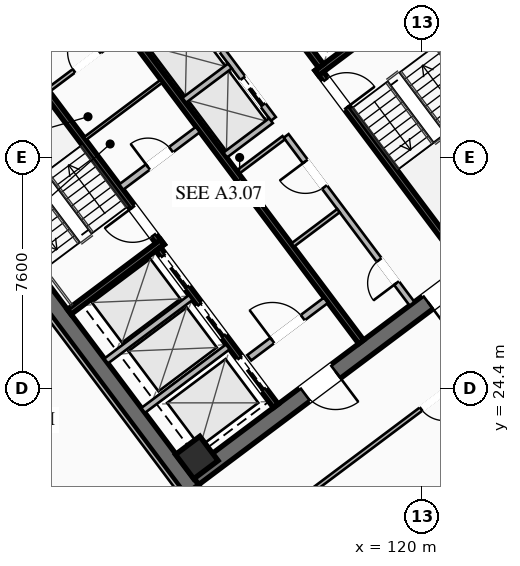
"""IFC4 building model, lengths in metres.
Left out: names, types, materials, properties, quantities, classifications, styles, units other than length and angle.
Written with IfcOpenShell. Run it as: python <this file> out.ifc"""

import sys

from ifc_helpers import new_model, si_unit, direction, frame, frame_2d, origin, origin_2d, place, context, subcontext, project, spatial, rectangle, hollow_rectangle, extrude, element, fill, save


model = new_model("IFC4")
c1 = context("Model", 3, precision=1e-05, world=origin(), true_north=direction((0.0, 1.0)))
c2 = subcontext(c1, "Body", "Model", "MODEL_VIEW")
j1 = project(units=[si_unit("LENGTHUNIT", "METRE"), si_unit("PLANEANGLEUNIT", "RADIAN")], contexts=[c1])
p1 = place(None, origin())
s1 = spatial("IfcSite", under=j1, at=p1, CompositionType="ELEMENT")
p2 = place(p1, origin())
s2 = spatial("IfcBuilding", under=s1, at=p2, CompositionType="ELEMENT")
p3 = place(p2, frame((0.0, 0.0, 185.4)))
s3 = spatial("IfcBuildingStorey", under=s2, at=p3, CompositionType="ELEMENT", Elevation=185.4)
for number, where, z_axis, x_axis in (
    (1, (112.436, 21.077, 0.0), (0.0, 0.0, 1.0), (-0.6, 0.8, 0.0)),
    (2, (115.564, 42.923, 0.0), (0.0, 0.0, 1.0), (0.6, -0.8, 0.0)),
):
    element("IfcWall", number, at=place(p3, frame(where, z_axis=z_axis, x_axis=x_axis)), inside=s3, PredefinedType="SHEAR", context=c2, shape_type="SweptSolid", body=[
        extrude(rectangle(XDim=15.6, YDim=0.55, at=frame_2d((7.8, 0.0))), origin(), (0.0, 0.0, 1.0), 3.55),
    ])
p4 = place(p3, frame((124.539, 30.498, 0.0), z_axis=(0.0, 0.0, 1.0), x_axis=(-0.799998054672, -0.600002593761, 0.0)))
e3 = element("IfcWall", 3, at=p4, inside=s3, PredefinedType="SHEAR", context=c2, shape_type="SweptSolid", body=[
    extrude(rectangle(XDim=15.06, YDim=0.55, at=frame_2d((7.53, 0.0))), origin(), (0.0, 0.0, 1.0), 3.55),
])
p5 = place(p4, frame((9.23, 0.0, 0.0)))
e4 = element("IfcOpeningElement", 4, at=p5, cuts=e3, PredefinedType="OPENING", context=c2, shape_type="SweptSolid", body=[
    extrude(rectangle(XDim=1.25, YDim=2.25, at=frame_2d((0.625, 1.125))), frame((0.0, 0.285, 0.0), z_axis=(0.0, -1.0, 0.0), x_axis=(1.0, 0.0, 0.0)), (0.0, 0.0, 1.0), 0.57),
])
p6 = place(p4, frame((4.18, 0.0, 0.0)))
e5 = element("IfcOpeningElement", 5, at=p6, cuts=e3, PredefinedType="OPENING", context=c2, shape_type="SweptSolid", body=[
    extrude(rectangle(XDim=1.25, YDim=2.25, at=frame_2d((0.625, 1.125))), frame((0.0, 0.285, 0.0), z_axis=(0.0, -1.0, 0.0), x_axis=(1.0, 0.0, 0.0)), (0.0, 0.0, 1.0), 0.57),
])
p7 = place(p3, frame((103.461, 33.502, 0.0), z_axis=(0.0, 0.0, 1.0), x_axis=(0.799998054672, 0.600002593761, 0.0)))
e6 = element("IfcWall", 6, at=p7, inside=s3, PredefinedType="SHEAR", context=c2, shape_type="SweptSolid", body=[
    extrude(rectangle(XDim=15.06, YDim=0.55, at=frame_2d((7.53, 0.0))), origin(), (0.0, 0.0, 1.0), 3.55),
])
p8 = place(p7, frame((4.58, 0.0, 0.0)))
e7 = element("IfcOpeningElement", 7, at=p8, cuts=e6, PredefinedType="OPENING", context=c2, shape_type="SweptSolid", body=[
    extrude(rectangle(XDim=1.25, YDim=2.25, at=frame_2d((0.625, 1.125))), frame((0.0, 0.285, 0.0), z_axis=(0.0, -1.0, 0.0), x_axis=(1.0, 0.0, 0.0)), (0.0, 0.0, 1.0), 0.57),
])
p9 = place(p7, frame((9.63, 0.0, 0.0)))
e8 = element("IfcOpeningElement", 8, at=p9, cuts=e6, PredefinedType="OPENING", context=c2, shape_type="SweptSolid", body=[
    extrude(rectangle(XDim=1.25, YDim=2.25, at=frame_2d((0.625, 1.125))), frame((0.0, 0.285, 0.0), z_axis=(0.0, -1.0, 0.0), x_axis=(1.0, 0.0, 0.0)), (0.0, 0.0, 1.0), 0.57),
])
p10 = place(p3, frame((112.59, 22.13, 0.0), z_axis=(0.0, 0.0, 1.0), x_axis=(0.799999996291, 0.600000004945, 0.0)))
e9 = element("IfcColumn", 9, at=p10, inside=s3, PredefinedType="COLUMN", context=c2, shape_type="SweptSolid", body=[
    extrude(hollow_rectangle(XDim=1.0, YDim=1.0, WallThickness=0.04, at=origin_2d()), origin(), (0.0, 0.0, 1.0), 3.37),
])
p11 = place(p3, frame((111.44, 29.08, 0.0), z_axis=(0.0, 0.0, 1.0), x_axis=(-0.59999029481, 0.8000072788, 0.0)))
e10 = element("IfcWall", 10, at=p11, inside=s3, PredefinedType="SHEAR", context=c2, shape_type="SweptSolid", body=[
    extrude(rectangle(XDim=8.05, YDim=0.2, at=frame_2d((4.025, 0.0))), origin(), (0.0, 0.0, 1.0), 3.37),
])
p12 = place(p11, frame((0.45, 0.0, 0.0)))
e11 = element("IfcOpeningElement", 11, at=p12, cuts=e10, PredefinedType="OPENING", context=c2, shape_type="SweptSolid", body=[
    extrude(rectangle(XDim=1.15, YDim=2.2, at=frame_2d((0.575, 1.1))), frame((0.0, 0.11, 0.0), z_axis=(0.0, -1.0, 0.0), x_axis=(1.0, 0.0, 0.0)), (0.0, 0.0, 1.0), 0.22),
])
p13 = place(p3, frame((108.396, 26.922, 0.0), z_axis=(0.0, 0.0, 1.0), x_axis=(0.800015298837, 0.599979601008, 0.0)))
e12 = element("IfcWall", 12, at=p13, inside=s3, PredefinedType="SHEAR", context=c2, shape_type="SweptSolid", body=[
    extrude(rectangle(XDim=3.83, YDim=0.2, at=frame_2d((1.915, 0.0))), origin(), (0.0, 0.0, 1.0), 3.37),
])
p14 = place(p3, frame((116.56, 34.92, 0.0), z_axis=(0.0, 0.0, 1.0), x_axis=(0.59999029481, -0.8000072788, 0.0)))
e13 = element("IfcWall", 13, at=p14, inside=s3, PredefinedType="SHEAR", context=c2, shape_type="SweptSolid", body=[
    extrude(rectangle(XDim=8.05, YDim=0.2, at=frame_2d((4.025, 0.0))), origin(), (0.0, 0.0, 1.0), 3.37),
])
p15 = place(p14, frame((0.45, 0.0, 0.0)))
e14 = element("IfcOpeningElement", 14, at=p15, cuts=e13, PredefinedType="OPENING", context=c2, shape_type="SweptSolid", body=[
    extrude(rectangle(XDim=1.15, YDim=2.2, at=frame_2d((0.575, 1.1))), frame((0.0, 0.11, 0.0), z_axis=(0.0, -1.0, 0.0), x_axis=(1.0, 0.0, 0.0)), (0.0, 0.0, 1.0), 0.22),
])
p16 = place(p3, frame((116.54, 34.78, 0.0), z_axis=(0.0, 0.0, 1.0), x_axis=(0.800015298837, 0.599979601008, 0.0)))
e15 = element("IfcWall", 15, at=p16, inside=s3, PredefinedType="SHEAR", context=c2, shape_type="SweptSolid", body=[
    extrude(rectangle(XDim=3.83, YDim=0.2, at=frame_2d((1.915, 0.0))), origin(), (0.0, 0.0, 1.0), 3.37),
])
p17 = place(p3, frame((117.998, 25.936, 0.0), z_axis=(0.0, 0.0, 1.0), x_axis=(-0.600002693989, 0.799997979501, 0.0)))
e16 = element("IfcWall", 16, at=p17, inside=s3, PredefinedType="SHEAR", context=c2, shape_type="SweptSolid", body=[
    extrude(rectangle(XDim=14.5, YDim=0.2, at=frame_2d((7.25, 0.0))), origin(), (0.0, 0.0, 1.0), 3.37),
])
p18 = place(p3, frame((110.104, 31.028, 0.0), z_axis=(0.0, 0.0, 1.0), x_axis=(0.800018601094, 0.59997519774, 0.0)))
e17 = element("IfcWall", 17, at=p18, inside=s3, PredefinedType="SOLIDWALL", context=c2, shape_type="SweptSolid", body=[
    extrude(rectangle(XDim=3.15, YDim=0.22, at=frame_2d((1.575, 0.0))), origin(), (0.0, 0.0, 1.0), 2.723),
])
p19 = place(p18, frame((1.1, 0.0, 0.0)))
e18 = element("IfcOpeningElement", 18, at=p19, cuts=e17, PredefinedType="OPENING", context=c2, shape_type="SweptSolid", body=[
    extrude(rectangle(XDim=0.95, YDim=2.05, at=frame_2d((0.475, 1.025))), frame((0.0, 0.12, 0.0), z_axis=(0.0, -1.0, 0.0), x_axis=(1.0, 0.0, 0.0)), (0.0, 0.0, 1.0), 0.24),
])
p20 = place(p3, frame((114.316, 25.412, 0.0), z_axis=(0.0, 0.0, 1.0), x_axis=(0.800018601094, 0.59997519774, 0.0)))
e19 = element("IfcWall", 19, at=p20, inside=s3, PredefinedType="SOLIDWALL", context=c2, shape_type="SweptSolid", body=[
    extrude(rectangle(XDim=3.15, YDim=0.22, at=frame_2d((1.575, 0.0))), origin(), (0.0, 0.0, 1.0), 2.723),
])
p21 = place(p20, frame((0.95, 0.0, 0.0)))
e20 = element("IfcOpeningElement", 20, at=p21, cuts=e19, PredefinedType="OPENING", context=c2, shape_type="SweptSolid", body=[
    extrude(rectangle(XDim=1.25, YDim=2.25, at=frame_2d((0.625, 1.125))), frame((0.0, 0.12, 0.0), z_axis=(0.0, -1.0, 0.0), x_axis=(1.0, 0.0, 0.0)), (0.0, 0.0, 1.0), 0.24),
])
p22 = place(p3, frame((115.19, 23.83, 0.0), z_axis=(0.0, 0.0, 1.0), x_axis=(-0.599993943644, 0.800004542231, 0.0)))
e21 = element("IfcWall", 21, at=p22, inside=s3, PredefinedType="SHEAR", context=c2, shape_type="SweptSolid", body=[
    extrude(rectangle(XDim=6.45, YDim=0.2, at=frame_2d((3.225, 0.0))), origin(), (0.0, 0.0, 1.0), 3.37),
])
p23 = place(p22, frame((4.875, 0.0, 0.0)))
e22 = element("IfcOpeningElement", 22, at=p23, cuts=e21, PredefinedType="OPENING", context=c2, shape_type="SweptSolid", body=[
    extrude(rectangle(XDim=1.3, YDim=2.25, at=frame_2d((0.65, 1.125))), frame((0.0, 0.11, 0.0), z_axis=(0.0, -1.0, 0.0), x_axis=(1.0, 0.0, 0.0)), (0.0, 0.0, 1.0), 0.22),
])
p24 = place(p22, frame((2.875, 0.0, 0.0)))
e23 = element("IfcOpeningElement", 23, at=p24, cuts=e21, PredefinedType="OPENING", context=c2, shape_type="SweptSolid", body=[
    extrude(rectangle(XDim=1.3, YDim=2.25, at=frame_2d((0.65, 1.125))), frame((0.0, 0.11, 0.0), z_axis=(0.0, -1.0, 0.0), x_axis=(1.0, 0.0, 0.0)), (0.0, 0.0, 1.0), 0.22),
])
p25 = place(p22, frame((0.675, 0.0, 0.0)))
e24 = element("IfcOpeningElement", 24, at=p25, cuts=e21, PredefinedType="OPENING", context=c2, shape_type="SweptSolid", body=[
    extrude(rectangle(XDim=1.3, YDim=2.25, at=frame_2d((0.65, 1.125))), frame((0.0, 0.11, 0.0), z_axis=(0.0, -1.0, 0.0), x_axis=(1.0, 0.0, 0.0)), (0.0, 0.0, 1.0), 0.22),
])
for number, where, z_axis, x_axis in (
    (25, (110.826, 23.682, 0.0), (0.0, 0.0, 1.0), (0.8, 0.6, 0.0)),
    (26, (109.608, 25.306, 0.0), (0.0, 0.0, 1.0), (0.8, 0.6, 0.0)),
):
    element("IfcWall", number, at=place(p3, frame(where, z_axis=z_axis, x_axis=x_axis)), inside=s3, PredefinedType="SOLIDWALL", context=c2, shape_type="SweptSolid", body=[
        extrude(rectangle(XDim=3.48, YDim=0.2, at=frame_2d((1.74, 0.0))), origin(), (0.0, 0.0, 1.0), 3.37),
    ])
p26 = place(p3, frame((112.81, 40.17, 0.0), z_axis=(0.0, 0.0, 1.0), x_axis=(0.599993943644, -0.800004542231, 0.0)))
e27 = element("IfcWall", 27, at=p26, inside=s3, PredefinedType="SHEAR", context=c2, shape_type="SweptSolid", body=[
    extrude(rectangle(XDim=6.45, YDim=0.2, at=frame_2d((3.225, 0.0))), origin(), (0.0, 0.0, 1.0), 3.37),
])
p27 = place(p3, frame((107.71, 34.22, 0.0), z_axis=(0.0, 0.0, 1.0), x_axis=(0.799981399002, 0.60002480053, 0.0)))
e28 = element("IfcWall", 28, at=p27, inside=s3, PredefinedType="PARTITIONING", context=c2, shape_type="SweptSolid", body=[
    extrude(rectangle(XDim=3.15, YDim=0.135, at=frame_2d((1.575, 0.0))), origin(), (0.0, 0.0, 1.0), 2.723),
])
p28 = place(p27, frame((1.05, 0.0, 0.0)))
e29 = element("IfcOpeningElement", 29, at=p28, cuts=e28, PredefinedType="OPENING", context=c2, shape_type="SweptSolid", body=[
    extrude(rectangle(XDim=1.05, YDim=2.2, at=frame_2d((0.525, 1.1))), frame((0.0, 0.077, 0.0), z_axis=(0.0, -1.0, 0.0), x_axis=(1.0, 0.0, 0.0)), (0.0, 0.0, 1.0), 0.155),
])
p29 = place(p3, frame((108.91, 32.62, 0.0), z_axis=(0.0, 0.0, 1.0), x_axis=(0.800018601094, 0.59997519774, 0.0)))
e30 = element("IfcWall", 30, at=p29, inside=s3, PredefinedType="PARTITIONING", context=c2, shape_type="SweptSolid", body=[
    extrude(rectangle(XDim=3.15, YDim=0.11, at=frame_2d((1.575, 0.0))), origin(), (0.0, 0.0, 1.0), 2.723),
])
p30 = place(p3, frame((119.67, 27.19, 0.0), z_axis=(0.0, 0.0, 1.0), x_axis=(-0.599988677396, 0.800008491828, 0.0)))
e31 = element("IfcWall", 31, at=p30, inside=s3, PredefinedType="SOLIDWALL", context=c2, shape_type="SweptSolid", body=[
    extrude(rectangle(XDim=6.9, YDim=0.2, at=frame_2d((3.45, 0.0))), origin(), (0.0, 0.0, 1.0), 2.723),
])
p31 = place(p30, frame((0.85, 0.0, 0.0)))
e32 = element("IfcOpeningElement", 32, at=p31, cuts=e31, PredefinedType="OPENING", context=c2, shape_type="SweptSolid", body=[
    extrude(rectangle(XDim=0.95, YDim=2.05, at=frame_2d((0.475, 1.025))), frame((0.0, 0.11, 0.0), z_axis=(0.0, -1.0, 0.0), x_axis=(1.0, 0.0, 0.0)), (0.0, 0.0, 1.0), 0.22),
])
p32 = place(p30, frame((4.8, 0.0, 0.0)))
e33 = element("IfcOpeningElement", 33, at=p32, cuts=e31, PredefinedType="OPENING", context=c2, shape_type="SweptSolid", body=[
    extrude(rectangle(XDim=1.05, YDim=2.2, at=frame_2d((0.525, 1.1))), frame((0.0, 0.11, 0.0), z_axis=(0.0, -1.0, 0.0), x_axis=(1.0, 0.0, 0.0)), (0.0, 0.0, 1.0), 0.22),
])
for number, where, z_axis, x_axis in (
    (34, (113.946, 31.522, 0.0), (0.0, 0.0, 1.0), (0.8, 0.6, 0.0)),
    (35, (115.746, 29.122, 0.0), (0.0, 0.0, 1.0), (0.8, 0.6, 0.0)),
):
    element("IfcWall", number, at=place(p3, frame(where, z_axis=z_axis, x_axis=x_axis)), inside=s3, PredefinedType="PARTITIONING", context=c2, shape_type="SweptSolid", body=[
        extrude(rectangle(XDim=1.88, YDim=0.135, at=frame_2d((0.94, 0.0))), origin(), (0.0, 0.0, 1.0), 2.723),
    ])
p33 = place(p3, frame((115.11, 33.27, 0.0), z_axis=(0.0, 0.0, 1.0), x_axis=(-0.600011322243, 0.799991508192, 0.0)))
e36 = element("IfcWall", 36, at=p33, inside=s3, PredefinedType="SOLIDWALL", context=c2, shape_type="SweptSolid", body=[
    extrude(rectangle(XDim=6.9, YDim=0.2, at=frame_2d((3.45, 0.0))), origin(), (0.0, 0.0, 1.0), 3.37),
])
p34 = place(p33, frame((0.575, 0.0, 0.0)))
e37 = element("IfcOpeningElement", 37, at=p34, cuts=e36, PredefinedType="OPENING", context=c2, shape_type="SweptSolid", body=[
    extrude(rectangle(XDim=1.1, YDim=2.2, at=frame_2d((0.55, 1.1))), frame((0.0, 0.11, 0.0), z_axis=(0.0, -1.0, 0.0), x_axis=(1.0, 0.0, 0.0)), (0.0, 0.0, 1.0), 0.22),
])
p35 = place(p33, frame((2.825, 0.0, 0.0)))
e38 = element("IfcOpeningElement", 38, at=p35, cuts=e36, PredefinedType="OPENING", context=c2, shape_type="SweptSolid", body=[
    extrude(rectangle(XDim=1.1, YDim=2.2, at=frame_2d((0.55, 1.1))), frame((0.0, 0.11, 0.0), z_axis=(0.0, -1.0, 0.0), x_axis=(1.0, 0.0, 0.0)), (0.0, 0.0, 1.0), 0.22),
])
p36 = place(p33, frame((5.075, 0.0, 0.0)))
e39 = element("IfcOpeningElement", 39, at=p36, cuts=e36, PredefinedType="OPENING", context=c2, shape_type="SweptSolid", body=[
    extrude(rectangle(XDim=1.1, YDim=2.2, at=frame_2d((0.55, 1.1))), frame((0.0, 0.11, 0.0), z_axis=(0.0, -1.0, 0.0), x_axis=(1.0, 0.0, 0.0)), (0.0, 0.0, 1.0), 0.22),
])
p37 = place(p3, frame((113.526, 32.082, 0.0), z_axis=(0.0, 0.0, 1.0), x_axis=(0.800046745961, 0.599937666993, 0.0)))
e40 = element("IfcWall", 40, at=p37, inside=s3, PredefinedType="SOLIDWALL", context=c2, shape_type="SweptSolid", body=[
    extrude(rectangle(XDim=1.88, YDim=0.2, at=frame_2d((0.94, 0.0))), origin(), (0.0, 0.0, 1.0), 3.37),
])
p38 = place(p3, frame((112.176, 33.882, 0.0), z_axis=(0.0, 0.0, 1.0), x_axis=(0.8, 0.6, 0.0)))
e41 = element("IfcWall", 41, at=p38, inside=s3, PredefinedType="SOLIDWALL", context=c2, shape_type="SweptSolid", body=[
    extrude(rectangle(XDim=1.88, YDim=0.2, at=frame_2d((0.94, 0.0))), origin(), (0.0, 0.0, 1.0), 3.37),
])
p39 = place(p3, frame((96.778, 31.046, 0.0), z_axis=(0.0, 0.0, 1.0), x_axis=(0.799995916807, 0.600005444218, 0.0)))
e42 = element("IfcWall", 42, at=p39, inside=s3, PredefinedType="PARTITIONING", context=c2, shape_type="SweptSolid", body=[
    extrude(rectangle(XDim=28.7, YDim=0.135, at=frame_2d((14.35, 0.0))), origin(), (0.0, 0.0, 1.0), 2.723),
])
p40 = place(p39, frame((0.3, 0.0, 0.0)))
e43 = element("IfcOpeningElement", 43, at=p40, cuts=e42, PredefinedType="OPENING", context=c2, shape_type="SweptSolid", body=[
    extrude(rectangle(XDim=0.95, YDim=2.05, at=frame_2d((0.475, 1.025))), frame((0.0, 0.077, 0.0), z_axis=(0.0, -1.0, 0.0), x_axis=(1.0, 0.0, 0.0)), (0.0, 0.0, 1.0), 0.155),
])
p41 = place(p39, frame((13.82, 0.0, 0.0)))
e44 = element("IfcOpeningElement", 44, at=p41, cuts=e42, PredefinedType="OPENING", context=c2, shape_type="SweptSolid", body=[
    extrude(rectangle(XDim=0.95, YDim=2.05, at=frame_2d((0.475, 1.025))), frame((0.0, 0.077, 0.0), z_axis=(0.0, -1.0, 0.0), x_axis=(1.0, 0.0, 0.0)), (0.0, 0.0, 1.0), 0.155),
])
p42 = place(p39, frame((17.821, 0.0, 0.0)))
e45 = element("IfcOpeningElement", 45, at=p42, cuts=e42, PredefinedType="OPENING", context=c2, shape_type="SweptSolid", body=[
    extrude(rectangle(XDim=0.95, YDim=2.05, at=frame_2d((0.475, 1.025))), frame((0.0, 0.077, 0.0), z_axis=(0.0, -1.0, 0.0), x_axis=(1.0, 0.0, 0.0)), (0.0, 0.0, 1.0), 0.155),
])
p43 = place(p39, frame((27.45, 0.0, 0.0)))
e46 = element("IfcOpeningElement", 46, at=p43, cuts=e42, PredefinedType="OPENING", context=c2, shape_type="SweptSolid", body=[
    extrude(rectangle(XDim=0.95, YDim=2.05, at=frame_2d((0.475, 1.025))), frame((0.0, 0.077, 0.0), z_axis=(0.0, -1.0, 0.0), x_axis=(1.0, 0.0, 0.0)), (0.0, 0.0, 1.0), 0.155),
])
p44 = place(p3, frame((131.6, 32.45, 0.0), z_axis=(0.0, 0.0, 1.0), x_axis=(-0.800003062365, -0.599995916825, 0.0)))
e47 = element("IfcWall", 47, at=p44, inside=s3, PredefinedType="PARTITIONING", context=c2, shape_type="SweptSolid", body=[
    extrude(rectangle(XDim=28.7, YDim=0.135, at=frame_2d((14.35, 0.0))), origin(), (0.0, 0.0, 1.0), 2.723),
])
p45 = place(p44, frame((27.37, 0.0, 0.0)))
e48 = element("IfcOpeningElement", 48, at=p45, cuts=e47, PredefinedType="OPENING", context=c2, shape_type="SweptSolid", body=[
    extrude(rectangle(XDim=0.95, YDim=2.05, at=frame_2d((0.475, 1.025))), frame((0.0, 0.077, 0.0), z_axis=(0.0, -1.0, 0.0), x_axis=(1.0, 0.0, 0.0)), (0.0, 0.0, 1.0), 0.155),
])
p46 = place(p44, frame((13.59, 0.0, 0.0)))
e49 = element("IfcOpeningElement", 49, at=p46, cuts=e47, PredefinedType="OPENING", context=c2, shape_type="SweptSolid", body=[
    extrude(rectangle(XDim=0.95, YDim=2.05, at=frame_2d((0.475, 1.025))), frame((0.0, 0.077, 0.0), z_axis=(0.0, -1.0, 0.0), x_axis=(1.0, 0.0, 0.0)), (0.0, 0.0, 1.0), 0.155),
])
p47 = place(p44, frame((9.796, 0.0, 0.0)))
e50 = element("IfcOpeningElement", 50, at=p47, cuts=e47, PredefinedType="OPENING", context=c2, shape_type="SweptSolid", body=[
    extrude(rectangle(XDim=0.95, YDim=2.05, at=frame_2d((0.475, 1.025))), frame((0.0, 0.077, 0.0), z_axis=(0.0, -1.0, 0.0), x_axis=(1.0, 0.0, 0.0)), (0.0, 0.0, 1.0), 0.155),
])
p48 = place(p44, frame((0.38, 0.0, 0.0)))
e51 = element("IfcOpeningElement", 51, at=p48, cuts=e47, PredefinedType="OPENING", context=c2, shape_type="SweptSolid", body=[
    extrude(rectangle(XDim=0.95, YDim=2.05, at=frame_2d((0.475, 1.025))), frame((0.0, 0.077, 0.0), z_axis=(0.0, -1.0, 0.0), x_axis=(1.0, 0.0, 0.0)), (0.0, 0.0, 1.0), 0.155),
])
p49 = place(p3, frame((112.104, 20.928, 0.0), z_axis=(0.0, 0.0, 1.0), x_axis=(-0.599994940075, 0.800003794918, 0.0)))
e52 = element("IfcWall", 52, at=p49, inside=s3, PredefinedType="PARTITIONING", context=c2, shape_type="SweptSolid", body=[
    extrude(rectangle(XDim=15.44, YDim=0.135, at=frame_2d((7.72, 0.0))), origin(), (0.0, 0.0, 1.0), 2.723),
])
p50 = place(p5, origin())
e53 = element("IfcDoor", 53, at=p50, inside=s3, OperationType="SINGLE_SWING_LEFT", PredefinedType="DOOR", context=c2, shape_type="SweptSolid", body=[
    extrude(rectangle(XDim=1.25, YDim=2.25, at=frame_2d((0.625, 1.125))), frame((0.0, 0.025, 0.0), z_axis=(0.0, -1.0, 0.0), x_axis=(1.0, 0.0, 0.0)), (0.0, 0.0, 1.0), 0.05),
])
fill(e4, e53)
p51 = place(p6, origin())
e54 = element("IfcDoor", 54, at=p51, inside=s3, OperationType="SINGLE_SWING_RIGHT", PredefinedType="DOOR", context=c2, shape_type="SweptSolid", body=[
    extrude(rectangle(XDim=1.25, YDim=2.25, at=frame_2d((0.625, 1.125))), frame((0.0, 0.025, 0.0), z_axis=(0.0, -1.0, 0.0), x_axis=(1.0, 0.0, 0.0)), (0.0, 0.0, 1.0), 0.05),
])
fill(e5, e54)
p52 = place(p12, origin())
e55 = element("IfcDoor", 55, at=p52, inside=s3, OperationType="SINGLE_SWING_RIGHT", PredefinedType="DOOR", context=c2, shape_type="SweptSolid", body=[
    extrude(rectangle(XDim=1.15, YDim=2.2, at=frame_2d((0.575, 1.1))), frame((0.0, 0.025, 0.0), z_axis=(0.0, -1.0, 0.0), x_axis=(1.0, 0.0, 0.0)), (0.0, 0.0, 1.0), 0.05),
])
fill(e11, e55)
p53 = place(p15, origin())
e56 = element("IfcDoor", 56, at=p53, inside=s3, OperationType="SINGLE_SWING_RIGHT", PredefinedType="DOOR", context=c2, shape_type="SweptSolid", body=[
    extrude(rectangle(XDim=1.15, YDim=2.2, at=frame_2d((0.575, 1.1))), frame((0.0, 0.025, 0.0), z_axis=(0.0, -1.0, 0.0), x_axis=(1.0, 0.0, 0.0)), (0.0, 0.0, 1.0), 0.05),
])
fill(e14, e56)
p54 = place(p21, origin())
e57 = element("IfcDoor", 57, at=p54, inside=s3, OperationType="SINGLE_SWING_LEFT", PredefinedType="DOOR", context=c2, shape_type="SweptSolid", body=[
    extrude(rectangle(XDim=1.25, YDim=2.25, at=frame_2d((0.625, 1.125))), frame((0.0, 0.025, 0.0), z_axis=(0.0, -1.0, 0.0), x_axis=(1.0, 0.0, 0.0)), (0.0, 0.0, 1.0), 0.05),
])
fill(e20, e57)
p55 = place(p28, origin())
e58 = element("IfcDoor", 58, at=p55, inside=s3, OperationType="SINGLE_SWING_RIGHT", PredefinedType="DOOR", context=c2, shape_type="SweptSolid", body=[
    extrude(rectangle(XDim=1.05, YDim=2.2, at=frame_2d((0.525, 1.1))), frame((0.0, 0.025, 0.0), z_axis=(0.0, -1.0, 0.0), x_axis=(1.0, 0.0, 0.0)), (0.0, 0.0, 1.0), 0.05),
])
fill(e29, e58)
p56 = place(p19, origin())
e59 = element("IfcDoor", 59, at=p56, inside=s3, OperationType="SINGLE_SWING_LEFT", PredefinedType="DOOR", context=c2, shape_type="SweptSolid", body=[
    extrude(rectangle(XDim=0.95, YDim=2.05, at=frame_2d((0.475, 1.025))), frame((0.0, 0.025, 0.0), z_axis=(0.0, -1.0, 0.0), x_axis=(1.0, 0.0, 0.0)), (0.0, 0.0, 1.0), 0.05),
])
fill(e18, e59)
p57 = place(p31, origin())
e60 = element("IfcDoor", 60, at=p57, inside=s3, OperationType="SINGLE_SWING_LEFT", PredefinedType="DOOR", context=c2, shape_type="SweptSolid", body=[
    extrude(rectangle(XDim=0.95, YDim=2.05, at=frame_2d((0.475, 1.025))), frame((0.0, 0.025, 0.0), z_axis=(0.0, -1.0, 0.0), x_axis=(1.0, 0.0, 0.0)), (0.0, 0.0, 1.0), 0.05),
])
fill(e32, e60)
p58 = place(p32, origin())
e61 = element("IfcDoor", 61, at=p58, inside=s3, OperationType="SINGLE_SWING_RIGHT", PredefinedType="DOOR", context=c2, shape_type="SweptSolid", body=[
    extrude(rectangle(XDim=1.05, YDim=2.2, at=frame_2d((0.525, 1.1))), frame((0.0, 0.025, 0.0), z_axis=(0.0, -1.0, 0.0), x_axis=(1.0, 0.0, 0.0)), (0.0, 0.0, 1.0), 0.05),
])
fill(e33, e61)
p59 = place(p46, origin())
e62 = element("IfcDoor", 62, at=p59, inside=s3, OperationType="SINGLE_SWING_LEFT", PredefinedType="DOOR", context=c2, shape_type="SweptSolid", body=[
    extrude(rectangle(XDim=0.95, YDim=2.05, at=frame_2d((0.475, 1.025))), frame((0.0, 0.025, 0.0), z_axis=(0.0, -1.0, 0.0), x_axis=(1.0, 0.0, 0.0)), (0.0, 0.0, 1.0), 0.05),
])
fill(e49, e62)
p60 = place(p23, origin())
e63 = element("IfcDoor", 63, at=p60, inside=s3, OperationType="SLIDING_TO_LEFT", PredefinedType="DOOR", context=c2, shape_type="SweptSolid", body=[
    extrude(rectangle(XDim=1.3, YDim=2.25, at=frame_2d((0.65, 1.125))), frame((0.0, 0.025, 0.0), z_axis=(0.0, -1.0, 0.0), x_axis=(1.0, 0.0, 0.0)), (0.0, 0.0, 1.0), 0.05),
])
fill(e22, e63)
p61 = place(p24, origin())
e64 = element("IfcDoor", 64, at=p61, inside=s3, OperationType="SLIDING_TO_LEFT", PredefinedType="DOOR", context=c2, shape_type="SweptSolid", body=[
    extrude(rectangle(XDim=1.3, YDim=2.25, at=frame_2d((0.65, 1.125))), frame((0.0, 0.025, 0.0), z_axis=(0.0, -1.0, 0.0), x_axis=(1.0, 0.0, 0.0)), (0.0, 0.0, 1.0), 0.05),
])
fill(e23, e64)
p62 = place(p25, origin())
e65 = element("IfcDoor", 65, at=p62, inside=s3, OperationType="SLIDING_TO_LEFT", PredefinedType="DOOR", context=c2, shape_type="SweptSolid", body=[
    extrude(rectangle(XDim=1.3, YDim=2.25, at=frame_2d((0.65, 1.125))), frame((0.0, 0.025, 0.0), z_axis=(0.0, -1.0, 0.0), x_axis=(1.0, 0.0, 0.0)), (0.0, 0.0, 1.0), 0.05),
])
fill(e24, e65)
p63 = place(p34, origin())
e66 = element("IfcDoor", 66, at=p63, inside=s3, OperationType="SLIDING_TO_LEFT", PredefinedType="DOOR", context=c2, shape_type="SweptSolid", body=[
    extrude(rectangle(XDim=1.1, YDim=2.2, at=frame_2d((0.55, 1.1))), frame((0.0, 0.025, 0.0), z_axis=(0.0, -1.0, 0.0), x_axis=(1.0, 0.0, 0.0)), (0.0, 0.0, 1.0), 0.05),
])
fill(e37, e66)
save(model, sys.argv[1])
